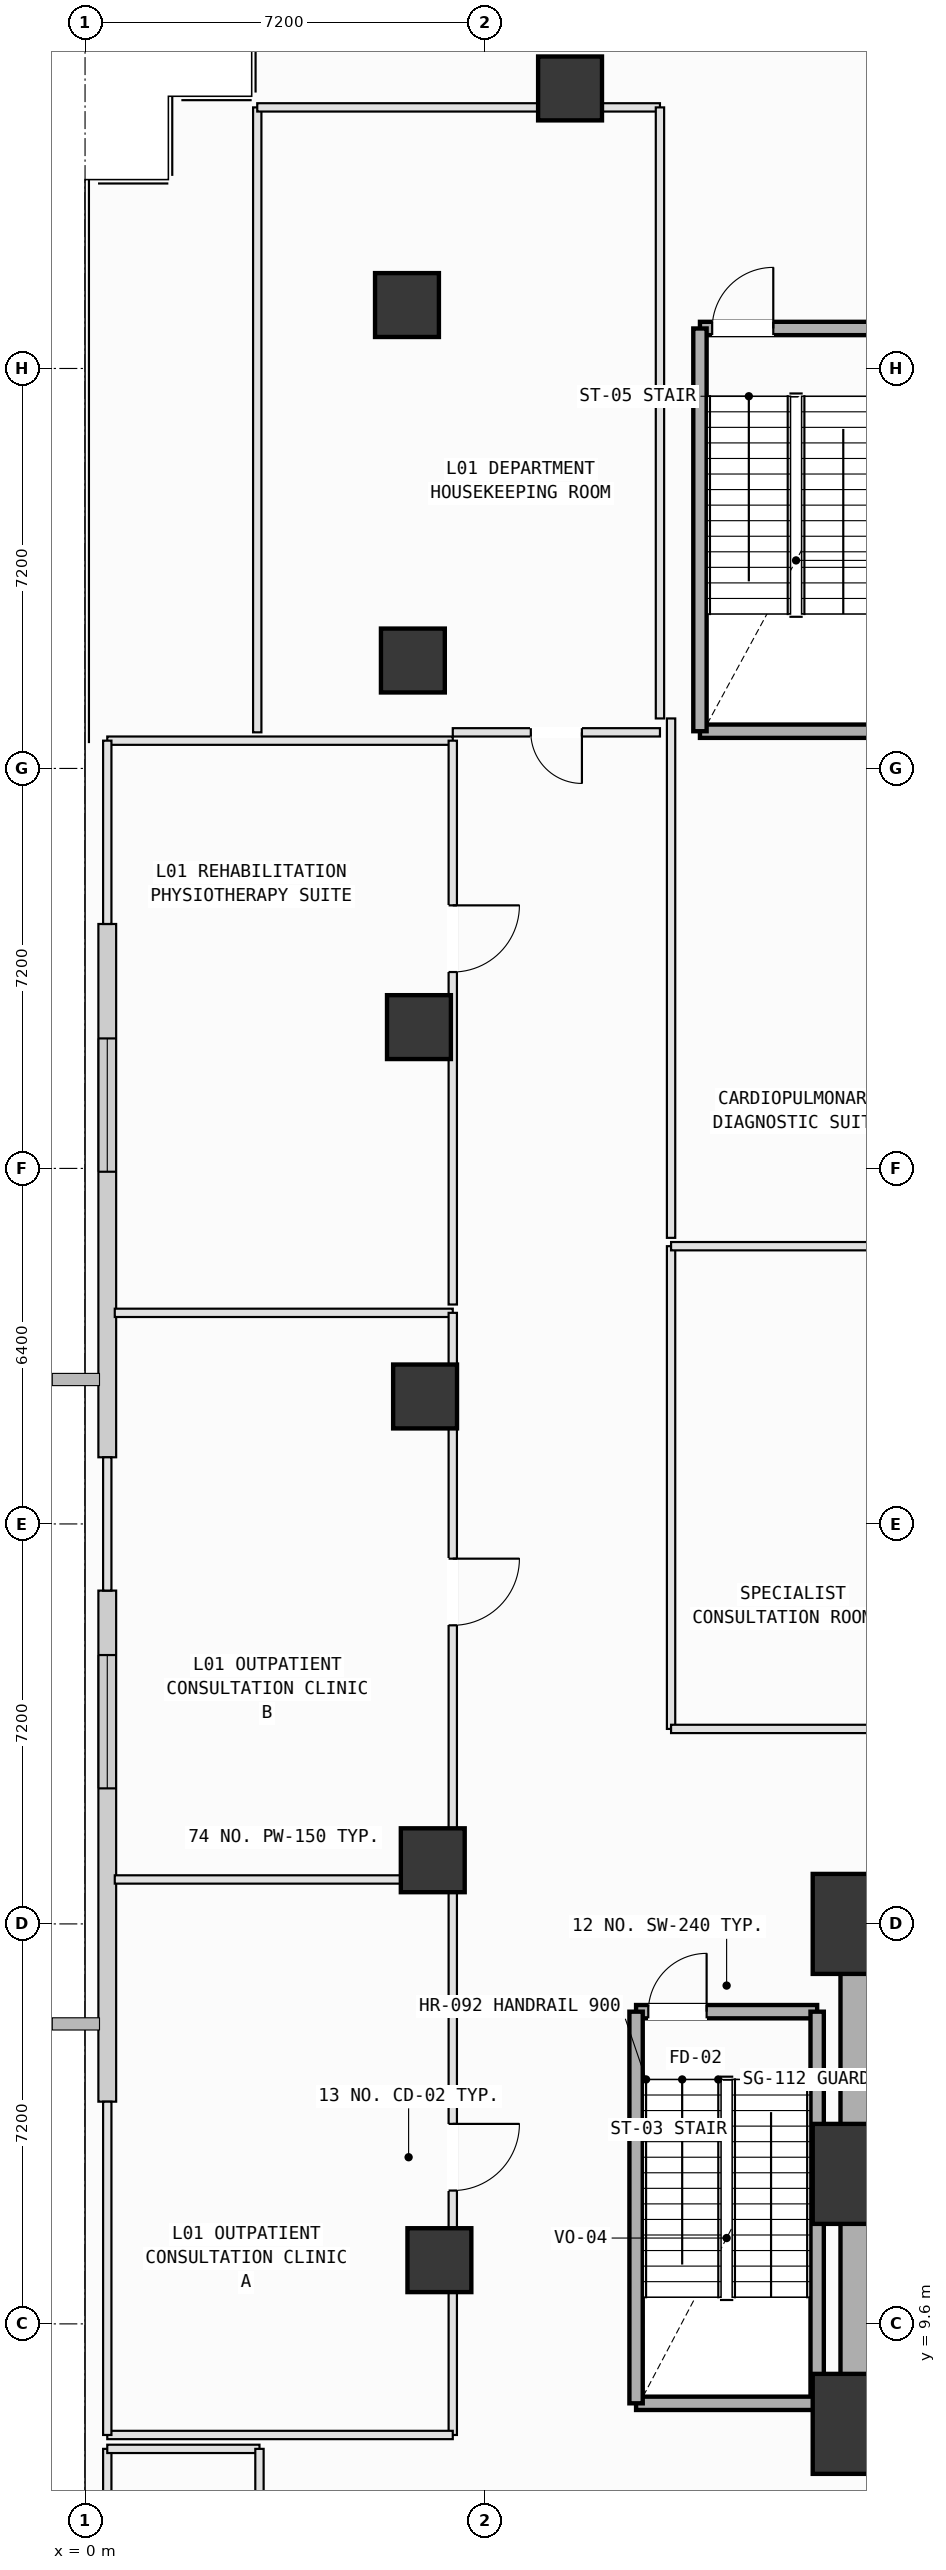
"""IFC4 building model, lengths in metres.
Left out: names, types, materials, properties, quantities, classifications, styles, units other than length and angle.
Written with IfcOpenShell. Run it as: python <this file> out.ifc"""

import sys

from ifc_helpers import new_model, si_unit, direction, frame, frame_2d, origin, origin_2d, place, context, subcontext, project, spatial, rectangle, extrude, element, fill, save


model = new_model("IFC4")
c1 = context("Model", 3, precision=1e-05, world=origin(), true_north=direction((0.0, 1.0)))
c2 = subcontext(c1, "Body", "Model", "MODEL_VIEW")
j1 = project(units=[si_unit("LENGTHUNIT", "METRE"), si_unit("PLANEANGLEUNIT", "RADIAN")], contexts=[c1])
p1 = place(None, origin())
s1 = spatial("IfcSite", under=j1, at=p1, CompositionType="ELEMENT")
p2 = place(p1, origin())
s2 = spatial("IfcBuilding", under=s1, at=p2, CompositionType="ELEMENT")
p3 = place(p2, frame((0.0, 0.0, 5.4)))
s3 = spatial("IfcBuildingStorey", under=s2, at=p3, CompositionType="ELEMENT", Elevation=5.4)
for number, where, z_axis, x_axis in (
    (1, (14.0, 7.8, 0.0), (0.0, 0.0, 1.0), (1.0, 0.0, 0.0)),
    (2, (14.0, 12.3, 0.0), (0.0, 0.0, 1.0), (1.0, 0.0, 0.0)),
    (3, (14.0, 16.8, 0.0), (0.0, 0.0, 1.0), (1.0, 0.0, 0.0)),
):
    element("IfcColumn", number, at=place(p3, frame(where, z_axis=z_axis, x_axis=x_axis)), inside=s3, PredefinedType="COLUMN", context=c2, shape_type="SweptSolid", body=[
        extrude(rectangle(XDim=1.8, YDim=1.8, at=origin_2d()), origin(), (0.0, 0.0, 1.0), 5.4),
    ])
for number, where, z_axis, x_axis in (
    (4, (8.731, 49.841, 0.0), (0.0, 0.0, 1.0), (1.0, 0.0, 0.0)),
    (5, (5.796, 45.942, 0.0), (0.0, 0.0, 1.0), (1.0, 0.0, 0.0)),
    (6, (5.902, 39.543, 0.0), (0.0, 0.0, 1.0), (1.0, 0.0, 0.0)),
    (7, (6.011, 32.944, 0.0), (0.0, 0.0, 1.0), (1.0, 0.0, 0.0)),
    (8, (6.121, 26.295, 0.0), (0.0, 0.0, 1.0), (1.0, 0.0, 0.0)),
    (9, (6.26, 17.946, 0.0), (0.0, 0.0, 1.0), (1.0, 0.0, 0.0)),
    (10, (6.379, 10.747, 0.0), (0.0, 0.0, 1.0), (1.0, 0.0, 0.0)),
):
    element("IfcColumn", number, at=place(p3, frame(where, z_axis=z_axis, x_axis=x_axis)), inside=s3, PredefinedType="COLUMN", context=c2, shape_type="SweptSolid", body=[
        extrude(rectangle(XDim=1.15, YDim=1.15, at=origin_2d()), origin(), (0.0, 0.0, 1.0), 5.4),
    ])
p4 = place(p3, frame((0.4, 13.6, 0.0), z_axis=(0.0, 0.0, 1.0), x_axis=(0.0, 1.0, 0.0)))
e11 = element("IfcWall", 11, at=p4, inside=s3, PredefinedType="SOLIDWALL", context=c2, shape_type="SweptSolid", body=[
    extrude(rectangle(XDim=9.2, YDim=0.32, at=frame_2d((4.6, 0.0))), origin(), (0.0, 0.0, 1.0), 4.23),
])
p5 = place(p4, frame((5.64, 0.0, 0.8)))
e12 = element("IfcOpeningElement", 12, at=p5, cuts=e11, PredefinedType="OPENING", context=c2, shape_type="SweptSolid", body=[
    extrude(rectangle(XDim=2.4, YDim=2.2, at=frame_2d((1.2, 1.1))), frame((0.0, 0.17, 0.0), z_axis=(0.0, -1.0, 0.0), x_axis=(1.0, 0.0, 0.0)), (0.0, 0.0, 1.0), 0.34),
])
p6 = place(p3, frame((0.4, 25.2, 0.0), z_axis=(0.0, 0.0, 1.0), x_axis=(0.0, 1.0, 0.0)))
e13 = element("IfcWall", 13, at=p6, inside=s3, PredefinedType="SOLIDWALL", context=c2, shape_type="SweptSolid", body=[
    extrude(rectangle(XDim=9.6, YDim=0.32, at=frame_2d((4.8, 0.0))), origin(), (0.0, 0.0, 1.0), 4.23),
])
p7 = place(p6, frame((5.14, 0.0, 0.8)))
e14 = element("IfcOpeningElement", 14, at=p7, cuts=e13, PredefinedType="OPENING", context=c2, shape_type="SweptSolid", body=[
    extrude(rectangle(XDim=2.4, YDim=2.2, at=frame_2d((1.2, 1.1))), frame((0.0, 0.17, 0.0), z_axis=(0.0, -1.0, 0.0), x_axis=(1.0, 0.0, 0.0)), (0.0, 0.0, 1.0), 0.34),
])
p8 = place(p3, frame((9.92, 15.22, 0.0), z_axis=(0.0, 0.0, 1.0), x_axis=(1.0, 0.0, 0.0)))
e15 = element("IfcWall", 15, at=p8, inside=s3, PredefinedType="SOLIDWALL", context=c2, shape_type="SweptSolid", body=[
    extrude(rectangle(XDim=3.26, YDim=0.24, at=frame_2d((1.63, 0.0))), origin(), (0.0, 0.0, 1.0), 5.15),
])
p9 = place(p8, frame((0.22, 0.0, 0.0)))
e16 = element("IfcOpeningElement", 16, at=p9, cuts=e15, PredefinedType="OPENING", context=c2, shape_type="SweptSolid", body=[
    extrude(rectangle(XDim=1.05, YDim=2.15, at=frame_2d((0.525, 1.075))), frame((0.0, 0.13, 0.0), z_axis=(0.0, -1.0, 0.0), x_axis=(1.0, 0.0, 0.0)), (0.0, 0.0, 1.0), 0.26),
])
p10 = place(p3, frame((13.18, 15.22, 0.0), z_axis=(0.0, 0.0, 1.0), x_axis=(0.0, -1.0, 0.0)))
e17 = element("IfcWall", 17, at=p10, inside=s3, PredefinedType="SOLIDWALL", context=c2, shape_type="SweptSolid", body=[
    extrude(rectangle(XDim=7.05, YDim=0.24, at=frame_2d((3.525, 0.0))), origin(), (0.0, 0.0, 1.0), 5.15),
])
p11 = place(p3, frame((13.18, 8.17, 0.0), z_axis=(0.0, 0.0, 1.0), x_axis=(-1.0, 0.0, 0.0)))
e18 = element("IfcWall", 18, at=p11, inside=s3, PredefinedType="SOLIDWALL", context=c2, shape_type="SweptSolid", body=[
    extrude(rectangle(XDim=3.26, YDim=0.24, at=frame_2d((1.63, 0.0))), origin(), (0.0, 0.0, 1.0), 5.15),
])
p12 = place(p3, frame((9.92, 8.17, 0.0), z_axis=(0.0, 0.0, 1.0), x_axis=(0.0, 1.0, 0.0)))
e19 = element("IfcWall", 19, at=p12, inside=s3, PredefinedType="SOLIDWALL", context=c2, shape_type="SweptSolid", body=[
    extrude(rectangle(XDim=7.05, YDim=0.24, at=frame_2d((3.525, 0.0))), origin(), (0.0, 0.0, 1.0), 5.15),
])
p13 = place(p3, frame((11.07, 45.52, 0.0), z_axis=(0.0, 0.0, 1.0), x_axis=(1.0, 0.0, 0.0)))
e20 = element("IfcWall", 20, at=p13, inside=s3, PredefinedType="SOLIDWALL", context=c2, shape_type="SweptSolid", body=[
    extrude(rectangle(XDim=3.46, YDim=0.24, at=frame_2d((1.73, 0.0))), origin(), (0.0, 0.0, 1.0), 5.15),
])
p14 = place(p13, frame((0.22, 0.0, 0.0)))
e21 = element("IfcOpeningElement", 21, at=p14, cuts=e20, PredefinedType="OPENING", context=c2, shape_type="SweptSolid", body=[
    extrude(rectangle(XDim=1.1, YDim=2.15, at=frame_2d((0.55, 1.075))), frame((0.0, 0.13, 0.0), z_axis=(0.0, -1.0, 0.0), x_axis=(1.0, 0.0, 0.0)), (0.0, 0.0, 1.0), 0.26),
])
p15 = place(p3, frame((14.53, 38.27, 0.0), z_axis=(0.0, 0.0, 1.0), x_axis=(-1.0, 0.0, 0.0)))
e22 = element("IfcWall", 22, at=p15, inside=s3, PredefinedType="SOLIDWALL", context=c2, shape_type="SweptSolid", body=[
    extrude(rectangle(XDim=3.46, YDim=0.24, at=frame_2d((1.73, 0.0))), origin(), (0.0, 0.0, 1.0), 5.15),
])
p16 = place(p3, frame((11.07, 38.27, 0.0), z_axis=(0.0, 0.0, 1.0), x_axis=(0.0, 1.0, 0.0)))
e23 = element("IfcWall", 23, at=p16, inside=s3, PredefinedType="SOLIDWALL", context=c2, shape_type="SweptSolid", body=[
    extrude(rectangle(XDim=7.25, YDim=0.24, at=frame_2d((3.625, 0.0))), origin(), (0.0, 0.0, 1.0), 5.15),
])
p17 = place(p3, frame((14.0, 7.8, 0.0), z_axis=(0.0, 0.0, 1.0), x_axis=(1.0, 0.0, 0.0)))
e24 = element("IfcWall", 24, at=p17, inside=s3, PredefinedType="SHEAR", context=c2, shape_type="SweptSolid", body=[
    extrude(rectangle(XDim=10.8, YDim=0.8, at=frame_2d((5.4, 0.0))), origin(), (0.0, 0.0, 1.0), 5.15),
])
p18 = place(p3, frame((14.0, 16.8, 0.0), z_axis=(0.0, 0.0, 1.0), x_axis=(0.0, -1.0, 0.0)))
e25 = element("IfcWall", 25, at=p18, inside=s3, PredefinedType="SHEAR", context=c2, shape_type="SweptSolid", body=[
    extrude(rectangle(XDim=9.0, YDim=0.8, at=frame_2d((4.5, 0.0))), origin(), (0.0, 0.0, 1.0), 5.15),
])
p19 = place(p3, frame((0.535, 17.6, 0.0), z_axis=(0.0, 0.0, 1.0), x_axis=(1.0, 0.0, 0.0)))
e26 = element("IfcWall", 26, at=p19, inside=s3, PredefinedType="PARTITIONING", context=c2, shape_type="SweptSolid", body=[
    extrude(rectangle(XDim=6.085, YDim=0.15, at=frame_2d((3.042, 0.0))), origin(), (0.0, 0.0, 1.0), 4.235),
])
p20 = place(p3, frame((6.62, 17.6, 0.0), z_axis=(0.0, 0.0, 1.0), x_axis=(0.0, -1.0, 0.0)))
e27 = element("IfcWall", 27, at=p20, inside=s3, PredefinedType="PARTITIONING", context=c2, shape_type="SweptSolid", body=[
    extrude(rectangle(XDim=10.0, YDim=0.15, at=frame_2d((5.0, 0.0))), origin(), (0.0, 0.0, 1.0), 4.235),
])
p21 = place(p20, frame((4.4, 0.0, 0.0)))
e28 = element("IfcOpeningElement", 28, at=p21, cuts=e27, PredefinedType="OPENING", context=c2, shape_type="SweptSolid", body=[
    extrude(rectangle(XDim=1.2, YDim=2.15, at=frame_2d((0.6, 1.075))), frame((0.0, 0.085, 0.0), z_axis=(0.0, -1.0, 0.0), x_axis=(1.0, 0.0, 0.0)), (0.0, 0.0, 1.0), 0.17),
])
p22 = place(p3, frame((6.62, 7.6, 0.0), z_axis=(0.0, 0.0, 1.0), x_axis=(-1.0, 0.0, 0.0)))
e29 = element("IfcWall", 29, at=p22, inside=s3, PredefinedType="PARTITIONING", context=c2, shape_type="SweptSolid", body=[
    extrude(rectangle(XDim=6.22, YDim=0.15, at=frame_2d((3.11, 0.0))), origin(), (0.0, 0.0, 1.0), 5.15),
])
p23 = place(p3, frame((0.4, 7.6, 0.0), z_axis=(0.0, 0.0, 1.0), x_axis=(0.0, 1.0, 0.0)))
e30 = element("IfcWall", 30, at=p23, inside=s3, PredefinedType="PARTITIONING", context=c2, shape_type="SweptSolid", body=[
    extrude(rectangle(XDim=6.0, YDim=0.15, at=frame_2d((3.0, 0.0))), origin(), (0.0, 0.0, 1.0), 5.15),
])
p24 = place(p3, frame((0.535, 27.8, 0.0), z_axis=(0.0, 0.0, 1.0), x_axis=(1.0, 0.0, 0.0)))
e31 = element("IfcWall", 31, at=p24, inside=s3, PredefinedType="PARTITIONING", context=c2, shape_type="SweptSolid", body=[
    extrude(rectangle(XDim=6.085, YDim=0.15, at=frame_2d((3.042, 0.0))), origin(), (0.0, 0.0, 1.0), 5.15),
])
p25 = place(p3, frame((6.62, 27.8, 0.0), z_axis=(0.0, 0.0, 1.0), x_axis=(0.0, -1.0, 0.0)))
e32 = element("IfcWall", 32, at=p25, inside=s3, PredefinedType="PARTITIONING", context=c2, shape_type="SweptSolid", body=[
    extrude(rectangle(XDim=10.05, YDim=0.15, at=frame_2d((5.025, 0.0))), origin(), (0.0, 0.0, 1.0), 4.235),
])
p26 = place(p25, frame((4.425, 0.0, 0.0)))
e33 = element("IfcOpeningElement", 33, at=p26, cuts=e32, PredefinedType="OPENING", context=c2, shape_type="SweptSolid", body=[
    extrude(rectangle(XDim=1.2, YDim=2.15, at=frame_2d((0.6, 1.075))), frame((0.0, 0.085, 0.0), z_axis=(0.0, -1.0, 0.0), x_axis=(1.0, 0.0, 0.0)), (0.0, 0.0, 1.0), 0.17),
])
p27 = place(p3, frame((0.4, 22.8, 0.0), z_axis=(0.0, 0.0, 1.0), x_axis=(0.0, 1.0, 0.0)))
e34 = element("IfcWall", 34, at=p27, inside=s3, PredefinedType="PARTITIONING", context=c2, shape_type="SweptSolid", body=[
    extrude(rectangle(XDim=2.4, YDim=0.15, at=frame_2d((1.2, 0.0))), origin(), (0.0, 0.0, 1.0), 5.15),
])
p28 = place(p3, frame((0.4, 38.1, 0.0), z_axis=(0.0, 0.0, 1.0), x_axis=(1.0, 0.0, 0.0)))
e35 = element("IfcWall", 35, at=p28, inside=s3, PredefinedType="PARTITIONING", context=c2, shape_type="SweptSolid", body=[
    extrude(rectangle(XDim=6.22, YDim=0.15, at=frame_2d((3.11, 0.0))), origin(), (0.0, 0.0, 1.0), 5.15),
])
p29 = place(p3, frame((6.62, 38.1, 0.0), z_axis=(0.0, 0.0, 1.0), x_axis=(0.0, -1.0, 0.0)))
e36 = element("IfcWall", 36, at=p29, inside=s3, PredefinedType="PARTITIONING", context=c2, shape_type="SweptSolid", body=[
    extrude(rectangle(XDim=10.15, YDim=0.15, at=frame_2d((5.075, 0.0))), origin(), (0.0, 0.0, 1.0), 4.235),
])
p30 = place(p29, frame((2.965, 0.0, 0.0)))
e37 = element("IfcOpeningElement", 37, at=p30, cuts=e36, PredefinedType="OPENING", context=c2, shape_type="SweptSolid", body=[
    extrude(rectangle(XDim=1.2, YDim=2.15, at=frame_2d((0.6, 1.075))), frame((0.0, 0.085, 0.0), z_axis=(0.0, -1.0, 0.0), x_axis=(1.0, 0.0, 0.0)), (0.0, 0.0, 1.0), 0.17),
])
p31 = place(p3, frame((0.4, 34.8, 0.0), z_axis=(0.0, 0.0, 1.0), x_axis=(0.0, 1.0, 0.0)))
e38 = element("IfcWall", 38, at=p31, inside=s3, PredefinedType="PARTITIONING", context=c2, shape_type="SweptSolid", body=[
    extrude(rectangle(XDim=3.3, YDim=0.15, at=frame_2d((1.65, 0.0))), origin(), (0.0, 0.0, 1.0), 5.15),
])
p32 = place(p3, frame((0.4, 3.0, 0.0), z_axis=(0.0, 0.0, 1.0), x_axis=(0.0, 1.0, 0.0)))
e39 = element("IfcWall", 39, at=p32, inside=s3, PredefinedType="PARTITIONING", context=c2, shape_type="SweptSolid", body=[
    extrude(rectangle(XDim=4.35, YDim=0.15, at=frame_2d((2.175, 0.0))), origin(), (0.0, 0.0, 1.0), 5.15),
])
p33 = place(p3, frame((0.4, 7.35, 0.0), z_axis=(0.0, 0.0, 1.0), x_axis=(1.0, 0.0, 0.0)))
e40 = element("IfcWall", 40, at=p33, inside=s3, PredefinedType="PARTITIONING", context=c2, shape_type="SweptSolid", body=[
    extrude(rectangle(XDim=2.74, YDim=0.15, at=frame_2d((1.37, 0.0))), origin(), (0.0, 0.0, 1.0), 5.15),
])
p34 = place(p3, frame((3.14, 7.35, 0.0), z_axis=(0.0, 0.0, 1.0), x_axis=(0.0, -1.0, 0.0)))
e41 = element("IfcWall", 41, at=p34, inside=s3, PredefinedType="PARTITIONING", context=c2, shape_type="SweptSolid", body=[
    extrude(rectangle(XDim=2.256, YDim=0.15, at=frame_2d((1.128, 0.0))), origin(), (0.0, 0.0, 1.0), 5.15),
])
p35 = place(p3, frame((10.55, 20.31, 0.0), z_axis=(0.0, 0.0, 1.0), x_axis=(0.0, 1.0, 0.0)))
e42 = element("IfcWall", 42, at=p35, inside=s3, PredefinedType="PARTITIONING", context=c2, shape_type="SweptSolid", body=[
    extrude(rectangle(XDim=8.69, YDim=0.15, at=frame_2d((4.345, 0.0))), origin(), (0.0, 0.0, 1.0), 5.15),
])
for number, where, z_axis, x_axis in (
    (43, (10.55, 29.0, 0.0), (0.0, 0.0, 1.0), (1.0, 0.0, 0.0)),
    (44, (15.14, 20.31, 0.0), (0.0, 0.0, 1.0), (-1.0, 0.0, 0.0)),
):
    element("IfcWall", number, at=place(p3, frame(where, z_axis=z_axis, x_axis=x_axis)), inside=s3, PredefinedType="PARTITIONING", context=c2, shape_type="SweptSolid", body=[
        extrude(rectangle(XDim=4.59, YDim=0.15, at=frame_2d((2.295, 0.0))), origin(), (0.0, 0.0, 1.0), 5.15),
    ])
p36 = place(p3, frame((10.55, 29.15, 0.0), z_axis=(0.0, 0.0, 1.0), x_axis=(0.0, 1.0, 0.0)))
e45 = element("IfcWall", 45, at=p36, inside=s3, PredefinedType="PARTITIONING", context=c2, shape_type="SweptSolid", body=[
    extrude(rectangle(XDim=9.35, YDim=0.15, at=frame_2d((4.675, 0.0))), origin(), (0.0, 0.0, 1.0), 5.15),
])
p37 = place(p3, frame((10.35, 38.25, 0.0), z_axis=(0.0, 0.0, 1.0), x_axis=(-1.0, 0.0, 0.0)))
e46 = element("IfcWall", 46, at=p37, inside=s3, PredefinedType="PARTITIONING", context=c2, shape_type="SweptSolid", body=[
    extrude(rectangle(XDim=3.73, YDim=0.15, at=frame_2d((1.865, 0.0))), origin(), (0.0, 0.0, 1.0), 5.15),
])
p38 = place(p37, frame((1.405, 0.0, 0.0)))
e47 = element("IfcOpeningElement", 47, at=p38, cuts=e46, PredefinedType="OPENING", context=c2, shape_type="SweptSolid", body=[
    extrude(rectangle(XDim=0.92, YDim=2.1, at=frame_2d((0.46, 1.05))), frame((0.0, 0.085, 0.0), z_axis=(0.0, -1.0, 0.0), x_axis=(1.0, 0.0, 0.0)), (0.0, 0.0, 1.0), 0.17),
])
p39 = place(p3, frame((3.1, 38.25, 0.0), z_axis=(0.0, 0.0, 1.0), x_axis=(0.0, 1.0, 0.0)))
e48 = element("IfcWall", 48, at=p39, inside=s3, PredefinedType="PARTITIONING", context=c2, shape_type="SweptSolid", body=[
    extrude(rectangle(XDim=11.25, YDim=0.15, at=frame_2d((5.625, 0.0))), origin(), (0.0, 0.0, 1.0), 5.15),
])
p40 = place(p3, frame((3.1, 49.5, 0.0), z_axis=(0.0, 0.0, 1.0), x_axis=(1.0, 0.0, 0.0)))
e49 = element("IfcWall", 49, at=p40, inside=s3, PredefinedType="PARTITIONING", context=c2, shape_type="SweptSolid", body=[
    extrude(rectangle(XDim=7.25, YDim=0.15, at=frame_2d((3.625, 0.0))), origin(), (0.0, 0.0, 1.0), 4.235),
])
p41 = place(p3, frame((10.35, 49.5, 0.0), z_axis=(0.0, 0.0, 1.0), x_axis=(0.0, -1.0, 0.0)))
e50 = element("IfcWall", 50, at=p41, inside=s3, PredefinedType="PARTITIONING", context=c2, shape_type="SweptSolid", body=[
    extrude(rectangle(XDim=11.0, YDim=0.15, at=frame_2d((5.5, 0.0))), origin(), (0.0, 0.0, 1.0), 5.15),
])
p42 = place(p5, origin())
e51 = element("IfcWindow", 51, at=p42, inside=s3, PartitioningType="SINGLE_PANEL", PredefinedType="WINDOW", context=c2, shape_type="SweptSolid", body=[
    extrude(rectangle(XDim=2.4, YDim=2.2, at=frame_2d((1.2, 1.1))), frame((0.0, 0.03, 0.0), z_axis=(0.0, -1.0, 0.0), x_axis=(1.0, 0.0, 0.0)), (0.0, 0.0, 1.0), 0.06),
])
fill(e12, e51)
p43 = place(p7, origin())
e52 = element("IfcWindow", 52, at=p43, inside=s3, PartitioningType="SINGLE_PANEL", PredefinedType="WINDOW", context=c2, shape_type="SweptSolid", body=[
    extrude(rectangle(XDim=2.4, YDim=2.2, at=frame_2d((1.2, 1.1))), frame((0.0, 0.03, 0.0), z_axis=(0.0, -1.0, 0.0), x_axis=(1.0, 0.0, 0.0)), (0.0, 0.0, 1.0), 0.06),
])
fill(e14, e52)
p44 = place(p9, origin())
e53 = element("IfcDoor", 53, at=p44, inside=s3, OperationType="SINGLE_SWING_RIGHT", PredefinedType="DOOR", context=c2, shape_type="SweptSolid", body=[
    extrude(rectangle(XDim=1.05, YDim=2.15, at=frame_2d((0.525, 1.075))), frame((0.0, 0.025, 0.0), z_axis=(0.0, -1.0, 0.0), x_axis=(1.0, 0.0, 0.0)), (0.0, 0.0, 1.0), 0.05),
])
fill(e16, e53)
p45 = place(p14, origin())
e54 = element("IfcDoor", 54, at=p45, inside=s3, OperationType="SINGLE_SWING_RIGHT", PredefinedType="DOOR", context=c2, shape_type="SweptSolid", body=[
    extrude(rectangle(XDim=1.1, YDim=2.15, at=frame_2d((0.55, 1.075))), frame((0.0, 0.025, 0.0), z_axis=(0.0, -1.0, 0.0), x_axis=(1.0, 0.0, 0.0)), (0.0, 0.0, 1.0), 0.05),
])
fill(e21, e54)
p46 = place(p21, origin())
e55 = element("IfcDoor", 55, at=p46, inside=s3, OperationType="SINGLE_SWING_LEFT", PredefinedType="DOOR", context=c2, shape_type="SweptSolid", body=[
    extrude(rectangle(XDim=1.2, YDim=2.15, at=frame_2d((0.6, 1.075))), frame((0.0, 0.025, 0.0), z_axis=(0.0, -1.0, 0.0), x_axis=(1.0, 0.0, 0.0)), (0.0, 0.0, 1.0), 0.05),
])
fill(e28, e55)
p47 = place(p26, origin())
e56 = element("IfcDoor", 56, at=p47, inside=s3, OperationType="SINGLE_SWING_LEFT", PredefinedType="DOOR", context=c2, shape_type="SweptSolid", body=[
    extrude(rectangle(XDim=1.2, YDim=2.15, at=frame_2d((0.6, 1.075))), frame((0.0, 0.025, 0.0), z_axis=(0.0, -1.0, 0.0), x_axis=(1.0, 0.0, 0.0)), (0.0, 0.0, 1.0), 0.05),
])
fill(e33, e56)
p48 = place(p30, origin())
e57 = element("IfcDoor", 57, at=p48, inside=s3, OperationType="SINGLE_SWING_LEFT", PredefinedType="DOOR", context=c2, shape_type="SweptSolid", body=[
    extrude(rectangle(XDim=1.2, YDim=2.15, at=frame_2d((0.6, 1.075))), frame((0.0, 0.025, 0.0), z_axis=(0.0, -1.0, 0.0), x_axis=(1.0, 0.0, 0.0)), (0.0, 0.0, 1.0), 0.05),
])
fill(e37, e57)
p49 = place(p38, origin())
e58 = element("IfcDoor", 58, at=p49, inside=s3, OperationType="SINGLE_SWING_LEFT", PredefinedType="DOOR", context=c2, shape_type="SweptSolid", body=[
    extrude(rectangle(XDim=0.92, YDim=2.1, at=frame_2d((0.46, 1.05))), frame((0.0, 0.025, 0.0), z_axis=(0.0, -1.0, 0.0), x_axis=(1.0, 0.0, 0.0)), (0.0, 0.0, 1.0), 0.05),
])
fill(e47, e58)
save(model, sys.argv[1])
